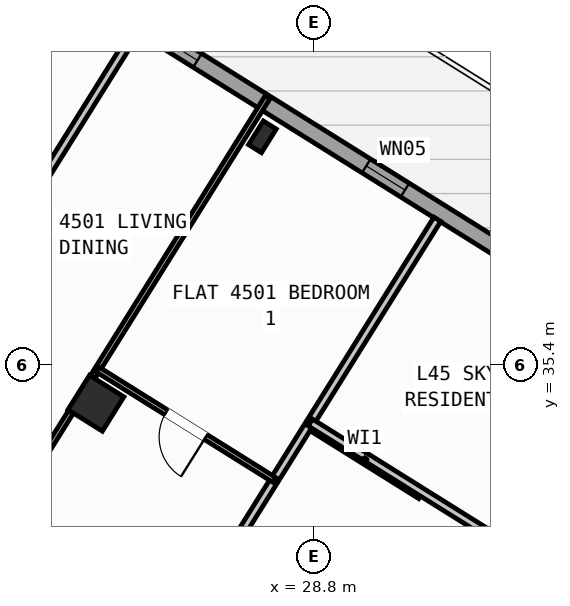
"""IFC4 building model, lengths in metres.
Left out: names, types, materials, properties, quantities, classifications, styles, units other than length and angle.
Written with IfcOpenShell. Run it as: python <this file> out.ifc"""

import sys

from ifc_helpers import new_model, si_unit, direction, frame, frame_2d, origin, origin_2d, place, context, subcontext, project, spatial, rectangle, hollow_rectangle, i_section, extrude, source, transform, mapped, element, fill, save


model = new_model("IFC4")
c1 = context("Model", 3, precision=1e-05, world=origin(), true_north=direction((0.0, 1.0)))
c2 = subcontext(c1, "Body", "Model", "MODEL_VIEW")
j1 = project(units=[si_unit("LENGTHUNIT", "METRE"), si_unit("PLANEANGLEUNIT", "RADIAN")], contexts=[c1])
p1 = place(None, origin())
s1 = spatial("IfcSite", under=j1, at=p1, CompositionType="ELEMENT")
p2 = place(p1, origin())
s2 = spatial("IfcBuilding", under=s1, at=p2, CompositionType="ELEMENT")
p3 = place(p2, frame((0.0, 0.0, 179.4)))
s3 = spatial("IfcBuildingStorey", under=s2, at=p3, CompositionType="ELEMENT", Elevation=179.4)
m1 = source(origin(), c2, "Body", "SweptSolid", [
    extrude(i_section(OverallWidth=0.3, OverallDepth=0.55, WebThickness=0.015, FlangeThickness=0.029, at=origin_2d()), origin(), (0.0, 0.0, 1.0), 4.8),
])
p4 = place(p3, frame((27.786, 39.901, 0.0), z_axis=(0.0, 0.0, 1.0), x_axis=(-0.848048096156, 0.529919264233, 0.0)))
e1 = element("IfcColumn", 1, at=p4, inside=s3, PredefinedType="COLUMN", context=c2, shape_type="MappedRepresentation", body=[
    mapped(m1, transform((0.0, 0.0, 0.0), scale=1.0)),
])
m2 = source(origin(), c2, "Body", "SweptSolid", [
    extrude(hollow_rectangle(XDim=0.8, YDim=0.8, WallThickness=0.032, at=origin_2d()), origin(), (0.0, 0.0, 1.0), 4.8),
])
p5 = place(p3, frame((24.5, 34.643, 0.0), z_axis=(0.0, 0.0, 1.0), x_axis=(-0.848048096156, 0.529919264233, 0.0)))
e2 = element("IfcColumn", 2, at=p5, inside=s3, PredefinedType="COLUMN", context=c2, shape_type="MappedRepresentation", body=[
    mapped(m2, transform((0.0, 0.0, 0.0), scale=1.0)),
])
p6 = place(p3, frame((17.424, 47.083, 0.0), z_axis=(0.0, 0.0, 1.0), x_axis=(0.848049927979, -0.529916332693, 0.0)))
e3 = element("IfcWall", 3, at=p6, inside=s3, PredefinedType="STANDARD", context=c2, shape_type="SweptSolid", body=[
    extrude(rectangle(XDim=29.223, YDim=0.32, at=frame_2d((14.612, 0.0))), origin(), (0.0, 0.0, 1.0), 4.55),
])
p7 = place(p6, frame((2.745, 0.0, 0.0)))
e4 = element("IfcOpeningElement", 4, at=p7, cuts=e3, PredefinedType="OPENING", context=c2, shape_type="SweptSolid", body=[
    extrude(rectangle(XDim=1.05, YDim=2.15, at=frame_2d((0.525, 1.075))), frame((0.0, 0.17, 0.0), z_axis=(0.0, -1.0, 0.0), x_axis=(1.0, 0.0, 0.0)), (0.0, 0.0, 1.0), 0.34),
])
p8 = place(p6, frame((21.926, 0.0, 0.75)))
e5 = element("IfcOpeningElement", 5, at=p8, cuts=e3, PredefinedType="OPENING", context=c2, shape_type="SweptSolid", body=[
    extrude(rectangle(XDim=2.4, YDim=1.6, at=frame_2d((1.2, 0.8))), frame((0.0, 0.17, 0.0), z_axis=(0.0, -1.0, 0.0), x_axis=(1.0, 0.0, 0.0)), (0.0, 0.0, 1.0), 0.34),
])
p9 = place(p6, frame((26.934, 0.0, 0.95)))
e6 = element("IfcOpeningElement", 6, at=p9, cuts=e3, PredefinedType="OPENING", context=c2, shape_type="SweptSolid", body=[
    extrude(rectangle(XDim=1.2, YDim=1.4, at=frame_2d((0.6, 0.7))), frame((0.0, 0.17, 0.0), z_axis=(0.0, -1.0, 0.0), x_axis=(1.0, 0.0, 0.0)), (0.0, 0.0, 1.0), 0.34),
])
p10 = place(p6, frame((10.057, 0.0, 1.0)))
e7 = element("IfcOpeningElement", 7, at=p10, cuts=e3, PredefinedType="OPENING", context=c2, shape_type="SweptSolid", body=[
    extrude(rectangle(XDim=0.65, YDim=1.15, at=frame_2d((0.325, 0.575))), frame((0.0, 0.17, 0.0), z_axis=(0.0, -1.0, 0.0), x_axis=(1.0, 0.0, 0.0)), (0.0, 0.0, 1.0), 0.34),
])
p11 = place(p6, frame((14.636, 0.0, 1.0)))
e8 = element("IfcOpeningElement", 8, at=p11, cuts=e3, PredefinedType="OPENING", context=c2, shape_type="SweptSolid", body=[
    extrude(rectangle(XDim=0.9, YDim=1.25, at=frame_2d((0.45, 0.625))), frame((0.0, 0.17, 0.0), z_axis=(0.0, -1.0, 0.0), x_axis=(1.0, 0.0, 0.0)), (0.0, 0.0, 1.0), 0.34),
])
p12 = place(p6, frame((8.052, 0.0, 1.0)))
e9 = element("IfcOpeningElement", 9, at=p12, cuts=e3, PredefinedType="OPENING", context=c2, shape_type="SweptSolid", body=[
    extrude(rectangle(XDim=0.65, YDim=1.15, at=frame_2d((0.325, 0.575))), frame((0.0, 0.17, 0.0), z_axis=(0.0, -1.0, 0.0), x_axis=(1.0, 0.0, 0.0)), (0.0, 0.0, 1.0), 0.34),
])
p13 = place(p3, frame((30.914, 32.829, 0.0), z_axis=(0.0, 0.0, 1.0), x_axis=(-0.848008813643, 0.529982124211, 0.0)))
e10 = element("IfcWall", 10, at=p13, inside=s3, PredefinedType="PARTITIONING", context=c2, shape_type="SweptSolid", body=[
    extrude(rectangle(XDim=2.61, YDim=0.16, at=frame_2d((1.305, 0.0))), origin(), (0.0, 0.0, 1.0), 4.54),
])
p14 = place(p3, frame((31.239, 38.274, 0.0), z_axis=(0.0, 0.0, 1.0), x_axis=(-0.529921796515, -0.848046513806, 0.0)))
e11 = element("IfcWall", 11, at=p14, inside=s3, PredefinedType="PARTITIONING", context=c2, shape_type="SweptSolid", body=[
    extrude(rectangle(XDim=16.5, YDim=0.16, at=frame_2d((8.25, 0.0))), origin(), (0.0, 0.0, 1.0), 4.54),
])
p15 = place(p3, frame((25.351, 42.095, 0.0), z_axis=(0.0, 0.0, 1.0), x_axis=(-0.529926315456, -0.848043690023, 0.0)))
e12 = element("IfcWall", 12, at=p15, inside=s3, PredefinedType="PARTITIONING", context=c2, shape_type="SweptSolid", body=[
    extrude(rectangle(XDim=16.62, YDim=0.16, at=frame_2d((8.31, 0.0))), origin(), (0.0, 0.0, 1.0), 4.54),
])
p16 = place(p3, frame((27.889, 40.685, 0.0), z_axis=(0.0, 0.0, 1.0), x_axis=(-0.529924752708, -0.848044666552, 0.0)))
e13 = element("IfcWall", 13, at=p16, inside=s3, PredefinedType="PARTITIONING", context=c2, shape_type="SweptSolid", body=[
    extrude(rectangle(XDim=6.508, YDim=0.11, at=frame_2d((3.254, 0.0))), origin(), (0.0, 0.0, 1.0), 4.54),
])
p17 = place(p3, frame((24.004, 34.467, 0.0), z_axis=(0.0, 0.0, 1.0), x_axis=(-0.529907440938, -0.848055484057, 0.0)))
e14 = element("IfcWall", 14, at=p17, inside=s3, PredefinedType="PARTITIONING", context=c2, shape_type="SweptSolid", body=[
    extrude(rectangle(XDim=6.476, YDim=0.11, at=frame_2d((3.238, 0.0))), origin(), (0.0, 0.0, 1.0), 4.54),
])
p18 = place(p17, frame((2.552, 0.0, 0.0)))
e15 = element("IfcOpeningElement", 15, at=p18, cuts=e14, PredefinedType="OPENING", context=c2, shape_type="SweptSolid", body=[
    extrude(rectangle(XDim=0.92, YDim=2.08, at=frame_2d((0.46, 1.04))), frame((0.0, 0.065, 0.0), z_axis=(0.0, -1.0, 0.0), x_axis=(1.0, 0.0, 0.0)), (0.0, 0.0, 1.0), 0.13),
])
p19 = place(p3, frame((28.023, 33.129, 0.0), z_axis=(0.0, 0.0, 1.0), x_axis=(-0.848051592054, 0.529913669587, 0.0)))
e16 = element("IfcWall", 16, at=p19, inside=s3, PredefinedType="PARTITIONING", context=c2, shape_type="SweptSolid", body=[
    extrude(rectangle(XDim=4.118, YDim=0.11, at=frame_2d((2.059, 0.0))), origin(), (0.0, 0.0, 1.0), 4.54),
])
p20 = place(p19, frame((1.599, 0.0, 0.0)))
e17 = element("IfcOpeningElement", 17, at=p20, cuts=e16, PredefinedType="OPENING", context=c2, shape_type="SweptSolid", body=[
    extrude(rectangle(XDim=0.92, YDim=2.08, at=frame_2d((0.46, 1.04))), frame((0.0, 0.065, 0.0), z_axis=(0.0, -1.0, 0.0), x_axis=(1.0, 0.0, 0.0)), (0.0, 0.0, 1.0), 0.13),
])
p21 = place(p3, frame((41.936, 26.012, 0.0), z_axis=(0.0, 0.0, 1.0), x_axis=(-0.848051154596, 0.529914369676, 0.0)))
e18 = element("IfcWall", 18, at=p21, inside=s3, PredefinedType="PARTITIONING", context=c2, shape_type="SweptSolid", body=[
    extrude(rectangle(XDim=15.57, YDim=0.16, at=frame_2d((7.785, 0.0))), origin(), (0.0, 0.0, 1.0), 4.54),
])
p22 = place(p21, frame((4.1, 0.0, 0.0)))
e19 = element("IfcOpeningElement", 19, at=p22, cuts=e18, PredefinedType="OPENING", context=c2, shape_type="SweptSolid", body=[
    extrude(rectangle(XDim=0.96, YDim=2.08, at=frame_2d((0.48, 1.04))), frame((0.0, 0.09, 0.0), z_axis=(0.0, -1.0, 0.0), x_axis=(1.0, 0.0, 0.0)), (0.0, 0.0, 1.0), 0.18),
])
p23 = place(p21, frame((8.2, 0.0, 0.0)))
e20 = element("IfcOpeningElement", 20, at=p23, cuts=e18, PredefinedType="OPENING", context=c2, shape_type="SweptSolid", body=[
    extrude(rectangle(XDim=1.7, YDim=2.2, at=frame_2d((0.85, 1.1))), frame((0.0, 0.09, 0.0), z_axis=(0.0, -1.0, 0.0), x_axis=(1.0, 0.0, 0.0)), (0.0, 0.0, 1.0), 0.18),
])
m3 = source(origin(), c2, "Body", "SweptSolid", [
    extrude(rectangle(XDim=0.65, YDim=1.15, at=frame_2d((0.325, 0.575))), frame((0.0, 0.03, 0.0), z_axis=(0.0, -1.0, 0.0), x_axis=(1.0, 0.0, 0.0)), (0.0, 0.0, 1.0), 0.06),
])
p24 = place(p10, origin())
e21 = element("IfcWindow", 21, at=p24, inside=s3, PartitioningType="SINGLE_PANEL", PredefinedType="WINDOW", context=c2, shape_type="MappedRepresentation", body=[
    mapped(m3, transform((0.0, 0.0, 0.0), scale=1.0)),
])
fill(e7, e21)
m4 = source(origin(), c2, "Body", "SweptSolid", [
    extrude(rectangle(XDim=0.9, YDim=1.25, at=frame_2d((0.45, 0.625))), frame((0.0, 0.03, 0.0), z_axis=(0.0, -1.0, 0.0), x_axis=(1.0, 0.0, 0.0)), (0.0, 0.0, 1.0), 0.06),
])
p25 = place(p11, origin())
e22 = element("IfcWindow", 22, at=p25, inside=s3, PartitioningType="SINGLE_PANEL", PredefinedType="WINDOW", context=c2, shape_type="MappedRepresentation", body=[
    mapped(m4, transform((0.0, 0.0, 0.0), scale=1.0)),
])
fill(e8, e22)
m5 = source(origin(), c2, "Body", "SweptSolid", [
    extrude(rectangle(XDim=0.92, YDim=2.08, at=frame_2d((0.46, 1.04))), frame((0.0, 0.025, 0.0), z_axis=(0.0, -1.0, 0.0), x_axis=(1.0, 0.0, 0.0)), (0.0, 0.0, 1.0), 0.05),
])
p26 = place(p20, origin())
e23 = element("IfcDoor", 23, at=p26, inside=s3, OperationType="SINGLE_SWING_LEFT", PredefinedType="DOOR", context=c2, shape_type="MappedRepresentation", body=[
    mapped(m5, transform((0.0, 0.0, 0.0), scale=1.0)),
])
fill(e17, e23)
save(model, sys.argv[1])
